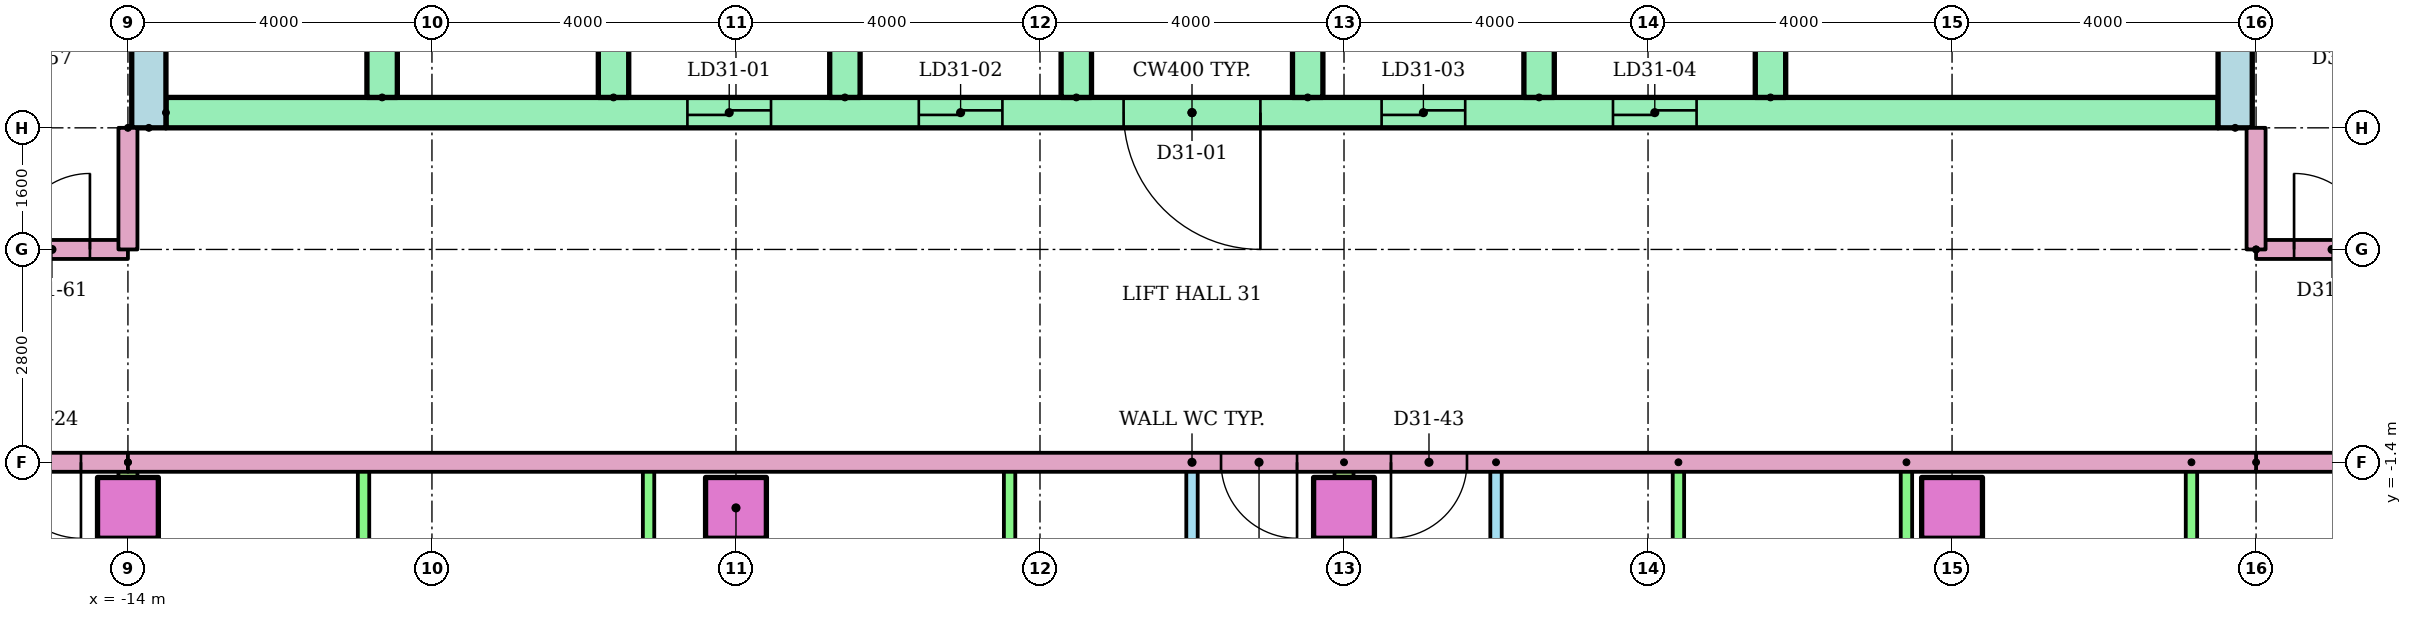
"""IFC4 building model, lengths in metres.
Left out: names, types, materials, properties, quantities, classifications, styles, units other than length and angle.
Written with IfcOpenShell. Run it as: python <this file> out.ifc"""

import sys

from ifc_helpers import new_model, si_unit, direction, frame, frame_2d, origin, origin_2d, place, context, subcontext, project, spatial, rectangle, extrude, element, fill, save


model = new_model("IFC4")
c1 = context("Model", 3, precision=1e-05, world=origin(), true_north=direction((0.0, 1.0)))
c2 = subcontext(c1, "Body", "Model", "MODEL_VIEW")
j1 = project(units=[si_unit("LENGTHUNIT", "METRE"), si_unit("PLANEANGLEUNIT", "RADIAN")], contexts=[c1])
p1 = place(None, origin())
s1 = spatial("IfcSite", under=j1, at=p1, CompositionType="ELEMENT")
p2 = place(p1, origin())
s2 = spatial("IfcBuilding", under=s1, at=p2, CompositionType="ELEMENT")
p3 = place(p2, frame((0.0, 0.0, 123.0)))
s3 = spatial("IfcBuildingStorey", under=s2, at=p3, CompositionType="ELEMENT", Elevation=123.0)
for number, where in (
    (1, (-14.0, -2.0, 0.0)),
    (2, (-6.0, -2.0, 0.0)),
    (3, (2.0, -2.0, 0.0)),
    (4, (10.0, -2.0, 0.0)),
):
    element("IfcColumn", number, at=place(p3, frame(where)), inside=s3, PredefinedType="COLUMN", context=c2, shape_type="SweptSolid", body=[
        extrude(rectangle(XDim=0.8, YDim=0.8, at=origin_2d()), origin(), (0.0, 0.0, 1.0), 3.2),
    ])
for number, where, z_axis, x_axis in (
    (5, (-13.725, 3.0, 0.0), (0.0, 0.0, 1.0), (0.0, 1.0, 0.0)),
    (6, (13.725, 3.0, 0.0), (0.0, 0.0, 1.0), (0.0, 1.0, 0.0)),
):
    element("IfcWall", number, at=place(p3, frame(where, z_axis=z_axis, x_axis=x_axis)), inside=s3, PredefinedType="SHEAR", context=c2, shape_type="SweptSolid", body=[
        extrude(rectangle(XDim=17.0, YDim=0.45, at=frame_2d((8.5, 0.0))), origin(), (0.0, 0.0, 1.0), 2.92),
    ])
p4 = place(p3, frame((-13.5, 3.2, 0.0)))
e7 = element("IfcWall", 7, at=p4, inside=s3, PredefinedType="SHEAR", context=c2, shape_type="SweptSolid", body=[
    extrude(rectangle(XDim=27.0, YDim=0.4, at=frame_2d((13.5, 0.0))), origin(), (0.0, 0.0, 1.0), 2.92),
])
p5 = place(p4, frame((6.861, 0.0, 0.0)))
e8 = element("IfcOpeningElement", 8, at=p5, cuts=e7, PredefinedType="OPENING", context=c2, shape_type="SweptSolid", body=[
    extrude(rectangle(XDim=1.1, YDim=2.1, at=frame_2d((0.55, 1.05))), frame((0.0, 0.21, 0.0), z_axis=(0.0, -1.0, 0.0), x_axis=(1.0, 0.0, 0.0)), (0.0, 0.0, 1.0), 0.42),
])
p6 = place(p4, frame((9.906, 0.0, 0.0)))
e9 = element("IfcOpeningElement", 9, at=p6, cuts=e7, PredefinedType="OPENING", context=c2, shape_type="SweptSolid", body=[
    extrude(rectangle(XDim=1.1, YDim=2.1, at=frame_2d((0.55, 1.05))), frame((0.0, 0.21, 0.0), z_axis=(0.0, -1.0, 0.0), x_axis=(1.0, 0.0, 0.0)), (0.0, 0.0, 1.0), 0.42),
])
p7 = place(p4, frame((15.994, 0.0, 0.0)))
e10 = element("IfcOpeningElement", 10, at=p7, cuts=e7, PredefinedType="OPENING", context=c2, shape_type="SweptSolid", body=[
    extrude(rectangle(XDim=1.1, YDim=2.1, at=frame_2d((0.55, 1.05))), frame((0.0, 0.21, 0.0), z_axis=(0.0, -1.0, 0.0), x_axis=(1.0, 0.0, 0.0)), (0.0, 0.0, 1.0), 0.42),
])
p8 = place(p4, frame((19.039, 0.0, 0.0)))
e11 = element("IfcOpeningElement", 11, at=p8, cuts=e7, PredefinedType="OPENING", context=c2, shape_type="SweptSolid", body=[
    extrude(rectangle(XDim=1.1, YDim=2.1, at=frame_2d((0.55, 1.05))), frame((0.0, 0.21, 0.0), z_axis=(0.0, -1.0, 0.0), x_axis=(1.0, 0.0, 0.0)), (0.0, 0.0, 1.0), 0.42),
])
p9 = place(p4, frame((12.6, 0.0, 0.0)))
e12 = element("IfcOpeningElement", 12, at=p9, cuts=e7, PredefinedType="OPENING", context=c2, shape_type="SweptSolid", body=[
    extrude(rectangle(XDim=1.8, YDim=2.1, at=frame_2d((0.9, 1.05))), frame((0.0, 0.21, 0.0), z_axis=(0.0, -1.0, 0.0), x_axis=(1.0, 0.0, 0.0)), (0.0, 0.0, 1.0), 0.42),
])
for number, where, z_axis, x_axis in (
    (13, (-10.656, 3.4, 0.0), (0.0, 0.0, 1.0), (0.0, 1.0, 0.0)),
    (14, (-7.611, 3.4, 0.0), (0.0, 0.0, 1.0), (0.0, 1.0, 0.0)),
    (15, (-4.567, 3.4, 0.0), (0.0, 0.0, 1.0), (0.0, 1.0, 0.0)),
    (16, (-1.522, 3.4, 0.0), (0.0, 0.0, 1.0), (0.0, 1.0, 0.0)),
    (17, (1.522, 3.4, 0.0), (0.0, 0.0, 1.0), (0.0, 1.0, 0.0)),
    (18, (4.567, 3.4, 0.0), (0.0, 0.0, 1.0), (0.0, 1.0, 0.0)),
    (19, (7.611, 3.4, 0.0), (0.0, 0.0, 1.0), (0.0, 1.0, 0.0)),
):
    element("IfcWall", number, at=place(p3, frame(where, z_axis=z_axis, x_axis=x_axis)), inside=s3, PredefinedType="SHEAR", context=c2, shape_type="SweptSolid", body=[
        extrude(rectangle(XDim=3.0, YDim=0.4, at=frame_2d((1.5, 0.0))), origin(), (0.0, 0.0, 1.0), 2.92),
    ])
p10 = place(p3, frame((0.0, -8.0, 0.0), z_axis=(0.0, 0.0, 1.0), x_axis=(0.0, 1.0, 0.0)))
e20 = element("IfcWall", 20, at=p10, inside=s3, PredefinedType="PARTITIONING", context=c2, shape_type="SweptSolid", body=[
    extrude(rectangle(XDim=6.6, YDim=0.15, at=frame_2d((3.3, 0.0))), origin(), (0.0, 0.0, 1.0), 2.4),
])
p11 = place(p10, frame((4.275, 0.0, 0.0)))
e21 = element("IfcOpeningElement", 21, at=p11, cuts=e20, PredefinedType="OPENING", context=c2, shape_type="SweptSolid", body=[
    extrude(rectangle(XDim=0.9, YDim=2.1, at=frame_2d((0.45, 1.05))), frame((0.0, 0.085, 0.0), z_axis=(0.0, -1.0, 0.0), x_axis=(1.0, 0.0, 0.0)), (0.0, 0.0, 1.0), 0.17),
])
p12 = place(p10, frame((1.025, 0.0, 0.0)))
e22 = element("IfcOpeningElement", 22, at=p12, cuts=e20, PredefinedType="OPENING", context=c2, shape_type="SweptSolid", body=[
    extrude(rectangle(XDim=0.8, YDim=2.1, at=frame_2d((0.4, 1.05))), frame((0.0, 0.085, 0.0), z_axis=(0.0, -1.0, 0.0), x_axis=(1.0, 0.0, 0.0)), (0.0, 0.0, 1.0), 0.17),
])
for number, where, z_axis, x_axis in (
    (23, (-2.4, -8.0, 0.0), (0.0, 0.0, 1.0), (0.0, 1.0, 0.0)),
    (24, (-7.15, -8.0, 0.0), (0.0, 0.0, 1.0), (0.0, 1.0, 0.0)),
    (25, (-10.9, -8.0, 0.0), (0.0, 0.0, 1.0), (0.0, 1.0, 0.0)),
):
    element("IfcWall", number, at=place(p3, frame(where, z_axis=z_axis, x_axis=x_axis)), inside=s3, PredefinedType="PARTITIONING", context=c2, shape_type="SweptSolid", body=[
        extrude(rectangle(XDim=6.6, YDim=0.15, at=frame_2d((3.3, 0.0))), origin(), (0.0, 0.0, 1.0), 2.4),
    ])
p13 = place(p3, frame((-14.0, -1.4, 0.0), z_axis=(0.0, 0.0, 1.0), x_axis=(0.0, -1.0, 0.0)))
e26 = element("IfcWall", 26, at=p13, inside=s3, PredefinedType="PARTITIONING", context=c2, shape_type="SweptSolid", body=[
    extrude(rectangle(XDim=14.91, YDim=0.25, at=frame_2d((7.455, 0.0))), origin(), (0.0, 0.0, 1.0), 2.4),
])
p14 = place(p3, frame((4.0, -1.4, 0.0), z_axis=(0.0, 0.0, 1.0), x_axis=(0.0, -1.0, 0.0)))
e27 = element("IfcWall", 27, at=p14, inside=s3, PredefinedType="PARTITIONING", context=c2, shape_type="SweptSolid", body=[
    extrude(rectangle(XDim=6.6, YDim=0.15, at=frame_2d((3.3, 0.0))), origin(), (0.0, 0.0, 1.0), 2.4),
])
p15 = place(p14, frame((1.425, 0.0, 0.0)))
e28 = element("IfcOpeningElement", 28, at=p15, cuts=e27, PredefinedType="OPENING", context=c2, shape_type="SweptSolid", body=[
    extrude(rectangle(XDim=0.9, YDim=2.1, at=frame_2d((0.45, 1.05))), frame((0.0, 0.085, 0.0), z_axis=(0.0, -1.0, 0.0), x_axis=(1.0, 0.0, 0.0)), (0.0, 0.0, 1.0), 0.17),
])
p16 = place(p14, frame((4.775, 0.0, 0.0)))
e29 = element("IfcOpeningElement", 29, at=p16, cuts=e27, PredefinedType="OPENING", context=c2, shape_type="SweptSolid", body=[
    extrude(rectangle(XDim=0.8, YDim=2.1, at=frame_2d((0.4, 1.05))), frame((0.0, 0.085, 0.0), z_axis=(0.0, -1.0, 0.0), x_axis=(1.0, 0.0, 0.0)), (0.0, 0.0, 1.0), 0.17),
])
for number, where, z_axis, x_axis in (
    (30, (6.4, -1.4, 0.0), (0.0, 0.0, 1.0), (0.0, -1.0, 0.0)),
    (31, (9.4, -1.4, 0.0), (0.0, 0.0, 1.0), (0.0, -1.0, 0.0)),
    (32, (13.15, -1.4, 0.0), (0.0, 0.0, 1.0), (0.0, -1.0, 0.0)),
):
    element("IfcWall", number, at=place(p3, frame(where, z_axis=z_axis, x_axis=x_axis)), inside=s3, PredefinedType="PARTITIONING", context=c2, shape_type="SweptSolid", body=[
        extrude(rectangle(XDim=6.6, YDim=0.15, at=frame_2d((3.3, 0.0))), origin(), (0.0, 0.0, 1.0), 2.4),
    ])
p17 = place(p3, frame((2.0, -1.4, 0.0), z_axis=(0.0, 0.0, 1.0), x_axis=(0.0, -1.0, 0.0)))
e33 = element("IfcWall", 33, at=p17, inside=s3, PredefinedType="PARTITIONING", context=c2, shape_type="SweptSolid", body=[
    extrude(rectangle(XDim=14.91, YDim=0.25, at=frame_2d((7.455, 0.0))), origin(), (0.0, 0.0, 1.0), 2.4),
])
p18 = place(p3, frame((-14.0, -1.4, 0.0), z_axis=(0.0, 0.0, 1.0), x_axis=(-1.0, 0.0, 0.0)))
e34 = element("IfcWall", 34, at=p18, inside=s3, PredefinedType="PARTITIONING", context=c2, shape_type="SweptSolid", body=[
    extrude(rectangle(XDim=15.0, YDim=0.25, at=frame_2d((7.5, 0.0))), origin(), (0.0, 0.0, 1.0), 2.4),
])
p19 = place(p18, frame((8.618, 0.0, 0.0)))
e35 = element("IfcOpeningElement", 35, at=p19, cuts=e34, PredefinedType="OPENING", context=c2, shape_type="SweptSolid", body=[
    extrude(rectangle(XDim=1.0, YDim=2.1, at=frame_2d((0.5, 1.05))), frame((0.0, 0.135, 0.0), z_axis=(0.0, -1.0, 0.0), x_axis=(1.0, 0.0, 0.0)), (0.0, 0.0, 1.0), 0.27),
])
p20 = place(p18, frame((0.618, 0.0, 0.0)))
e36 = element("IfcOpeningElement", 36, at=p20, cuts=e34, PredefinedType="OPENING", context=c2, shape_type="SweptSolid", body=[
    extrude(rectangle(XDim=1.0, YDim=2.1, at=frame_2d((0.5, 1.05))), frame((0.0, 0.135, 0.0), z_axis=(0.0, -1.0, 0.0), x_axis=(1.0, 0.0, 0.0)), (0.0, 0.0, 1.0), 0.27),
])
p21 = place(p3, frame((29.0, -1.4, 0.0), z_axis=(0.0, 0.0, 1.0), x_axis=(-1.0, 0.0, 0.0)))
e37 = element("IfcWall", 37, at=p21, inside=s3, PredefinedType="PARTITIONING", context=c2, shape_type="SweptSolid", body=[
    extrude(rectangle(XDim=15.0, YDim=0.25, at=frame_2d((7.5, 0.0))), origin(), (0.0, 0.0, 1.0), 2.4),
])
p22 = place(p21, frame((9.382, 0.0, 0.0)))
e38 = element("IfcOpeningElement", 38, at=p22, cuts=e37, PredefinedType="OPENING", context=c2, shape_type="SweptSolid", body=[
    extrude(rectangle(XDim=1.0, YDim=2.1, at=frame_2d((0.5, 1.05))), frame((0.0, 0.135, 0.0), z_axis=(0.0, -1.0, 0.0), x_axis=(1.0, 0.0, 0.0)), (0.0, 0.0, 1.0), 0.27),
])
p23 = place(p3, frame((-29.0, 1.4, 0.0)))
e39 = element("IfcWall", 39, at=p23, inside=s3, PredefinedType="PARTITIONING", context=c2, shape_type="SweptSolid", body=[
    extrude(rectangle(XDim=15.0, YDim=0.25, at=frame_2d((7.5, 0.0))), origin(), (0.0, 0.0, 1.0), 2.4),
])
p24 = place(p23, frame((5.382, 0.0, 0.0)))
e40 = element("IfcOpeningElement", 40, at=p24, cuts=e39, PredefinedType="OPENING", context=c2, shape_type="SweptSolid", body=[
    extrude(rectangle(XDim=1.0, YDim=2.1, at=frame_2d((0.5, 1.05))), frame((0.0, 0.135, 0.0), z_axis=(0.0, -1.0, 0.0), x_axis=(1.0, 0.0, 0.0)), (0.0, 0.0, 1.0), 0.27),
])
p25 = place(p23, frame((13.5, 0.0, 0.0)))
e41 = element("IfcOpeningElement", 41, at=p25, cuts=e39, PredefinedType="OPENING", context=c2, shape_type="SweptSolid", body=[
    extrude(rectangle(XDim=1.0, YDim=2.1, at=frame_2d((0.5, 1.05))), frame((0.0, 0.135, 0.0), z_axis=(0.0, -1.0, 0.0), x_axis=(1.0, 0.0, 0.0)), (0.0, 0.0, 1.0), 0.27),
])
p26 = place(p3, frame((14.0, 1.4, 0.0)))
e42 = element("IfcWall", 42, at=p26, inside=s3, PredefinedType="PARTITIONING", context=c2, shape_type="SweptSolid", body=[
    extrude(rectangle(XDim=15.0, YDim=0.25, at=frame_2d((7.5, 0.0))), origin(), (0.0, 0.0, 1.0), 2.4),
])
p27 = place(p26, frame((0.5, 0.0, 0.0)))
e43 = element("IfcOpeningElement", 43, at=p27, cuts=e42, PredefinedType="OPENING", context=c2, shape_type="SweptSolid", body=[
    extrude(rectangle(XDim=1.0, YDim=2.1, at=frame_2d((0.5, 1.05))), frame((0.0, 0.135, 0.0), z_axis=(0.0, -1.0, 0.0), x_axis=(1.0, 0.0, 0.0)), (0.0, 0.0, 1.0), 0.27),
])
p28 = place(p3, frame((14.0, -1.4, 0.0), z_axis=(0.0, 0.0, 1.0), x_axis=(-1.0, 0.0, 0.0)))
e44 = element("IfcWall", 44, at=p28, inside=s3, PredefinedType="PARTITIONING", context=c2, shape_type="SweptSolid", body=[
    extrude(rectangle(XDim=28.0, YDim=0.25, at=frame_2d((14.0, 0.0))), origin(), (0.0, 0.0, 1.0), 2.4),
])
p29 = place(p28, frame((12.618, 0.0, 0.0)))
e45 = element("IfcOpeningElement", 45, at=p29, cuts=e44, PredefinedType="OPENING", context=c2, shape_type="SweptSolid", body=[
    extrude(rectangle(XDim=1.0, YDim=2.1, at=frame_2d((0.5, 1.05))), frame((0.0, 0.135, 0.0), z_axis=(0.0, -1.0, 0.0), x_axis=(1.0, 0.0, 0.0)), (0.0, 0.0, 1.0), 0.27),
])
p30 = place(p28, frame((10.382, 0.0, 0.0)))
e46 = element("IfcOpeningElement", 46, at=p30, cuts=e44, PredefinedType="OPENING", context=c2, shape_type="SweptSolid", body=[
    extrude(rectangle(XDim=1.0, YDim=2.1, at=frame_2d((0.5, 1.05))), frame((0.0, 0.135, 0.0), z_axis=(0.0, -1.0, 0.0), x_axis=(1.0, 0.0, 0.0)), (0.0, 0.0, 1.0), 0.27),
])
for number, where, z_axis, x_axis in (
    (47, (-14.0, 3.0, 0.0), (0.0, 0.0, 1.0), (0.0, -1.0, 0.0)),
    (48, (14.0, 1.4, 0.0), (0.0, 0.0, 1.0), (0.0, 1.0, 0.0)),
):
    element("IfcWall", number, at=place(p3, frame(where, z_axis=z_axis, x_axis=x_axis)), inside=s3, PredefinedType="PARTITIONING", context=c2, shape_type="SweptSolid", body=[
        extrude(rectangle(XDim=1.6, YDim=0.25, at=frame_2d((0.8, 0.0))), origin(), (0.0, 0.0, 1.0), 2.4),
    ])
p31 = place(p5, origin())
e49 = element("IfcDoor", 49, at=p31, inside=s3, OperationType="SLIDING_TO_LEFT", PredefinedType="DOOR", context=c2, shape_type="SweptSolid", body=[
    extrude(rectangle(XDim=1.1, YDim=2.1, at=frame_2d((0.55, 1.05))), frame((0.0, 0.025, 0.0), z_axis=(0.0, -1.0, 0.0), x_axis=(1.0, 0.0, 0.0)), (0.0, 0.0, 1.0), 0.05),
])
fill(e8, e49)
p32 = place(p6, origin())
e50 = element("IfcDoor", 50, at=p32, inside=s3, OperationType="SLIDING_TO_LEFT", PredefinedType="DOOR", context=c2, shape_type="SweptSolid", body=[
    extrude(rectangle(XDim=1.1, YDim=2.1, at=frame_2d((0.55, 1.05))), frame((0.0, 0.025, 0.0), z_axis=(0.0, -1.0, 0.0), x_axis=(1.0, 0.0, 0.0)), (0.0, 0.0, 1.0), 0.05),
])
fill(e9, e50)
p33 = place(p7, origin())
e51 = element("IfcDoor", 51, at=p33, inside=s3, OperationType="SLIDING_TO_LEFT", PredefinedType="DOOR", context=c2, shape_type="SweptSolid", body=[
    extrude(rectangle(XDim=1.1, YDim=2.1, at=frame_2d((0.55, 1.05))), frame((0.0, 0.025, 0.0), z_axis=(0.0, -1.0, 0.0), x_axis=(1.0, 0.0, 0.0)), (0.0, 0.0, 1.0), 0.05),
])
fill(e10, e51)
p34 = place(p8, origin())
e52 = element("IfcDoor", 52, at=p34, inside=s3, OperationType="SLIDING_TO_LEFT", PredefinedType="DOOR", context=c2, shape_type="SweptSolid", body=[
    extrude(rectangle(XDim=1.1, YDim=2.1, at=frame_2d((0.55, 1.05))), frame((0.0, 0.025, 0.0), z_axis=(0.0, -1.0, 0.0), x_axis=(1.0, 0.0, 0.0)), (0.0, 0.0, 1.0), 0.05),
])
fill(e11, e52)
p35 = place(p9, frame((1.8, 0.0, 0.0), z_axis=(0.0, 0.0, 1.0), x_axis=(-1.0, 0.0, 0.0)))
e53 = element("IfcDoor", 53, at=p35, inside=s3, OperationType="DOUBLE_DOOR_SINGLE_SWING", PredefinedType="DOOR", context=c2, shape_type="SweptSolid", body=[
    extrude(rectangle(XDim=1.8, YDim=2.1, at=frame_2d((0.9, 1.05))), frame((0.0, 0.025, 0.0), z_axis=(0.0, -1.0, 0.0), x_axis=(1.0, 0.0, 0.0)), (0.0, 0.0, 1.0), 0.05),
])
fill(e12, e53)
p36 = place(p20, origin())
e54 = element("IfcDoor", 54, at=p36, inside=s3, OperationType="SINGLE_SWING_LEFT", PredefinedType="DOOR", context=c2, shape_type="SweptSolid", body=[
    extrude(rectangle(XDim=1.0, YDim=2.1, at=frame_2d((0.5, 1.05))), frame((0.0, 0.025, 0.0), z_axis=(0.0, -1.0, 0.0), x_axis=(1.0, 0.0, 0.0)), (0.0, 0.0, 1.0), 0.05),
])
fill(e36, e54)
p37 = place(p29, origin())
e55 = element("IfcDoor", 55, at=p37, inside=s3, OperationType="SINGLE_SWING_LEFT", PredefinedType="DOOR", context=c2, shape_type="SweptSolid", body=[
    extrude(rectangle(XDim=1.0, YDim=2.1, at=frame_2d((0.5, 1.05))), frame((0.0, 0.025, 0.0), z_axis=(0.0, -1.0, 0.0), x_axis=(1.0, 0.0, 0.0)), (0.0, 0.0, 1.0), 0.05),
])
fill(e45, e55)
p38 = place(p30, origin())
e56 = element("IfcDoor", 56, at=p38, inside=s3, OperationType="SINGLE_SWING_RIGHT", PredefinedType="DOOR", context=c2, shape_type="SweptSolid", body=[
    extrude(rectangle(XDim=1.0, YDim=2.1, at=frame_2d((0.5, 1.05))), frame((0.0, 0.025, 0.0), z_axis=(0.0, -1.0, 0.0), x_axis=(1.0, 0.0, 0.0)), (0.0, 0.0, 1.0), 0.05),
])
fill(e46, e56)
p39 = place(p25, origin())
e57 = element("IfcDoor", 57, at=p39, inside=s3, OperationType="SINGLE_SWING_RIGHT", PredefinedType="DOOR", context=c2, shape_type="SweptSolid", body=[
    extrude(rectangle(XDim=1.0, YDim=2.1, at=frame_2d((0.5, 1.05))), frame((0.0, 0.025, 0.0), z_axis=(0.0, -1.0, 0.0), x_axis=(1.0, 0.0, 0.0)), (0.0, 0.0, 1.0), 0.05),
])
fill(e41, e57)
p40 = place(p27, origin())
e58 = element("IfcDoor", 58, at=p40, inside=s3, OperationType="SINGLE_SWING_LEFT", PredefinedType="DOOR", context=c2, shape_type="SweptSolid", body=[
    extrude(rectangle(XDim=1.0, YDim=2.1, at=frame_2d((0.5, 1.05))), frame((0.0, 0.025, 0.0), z_axis=(0.0, -1.0, 0.0), x_axis=(1.0, 0.0, 0.0)), (0.0, 0.0, 1.0), 0.05),
])
fill(e43, e58)
save(model, sys.argv[1])
